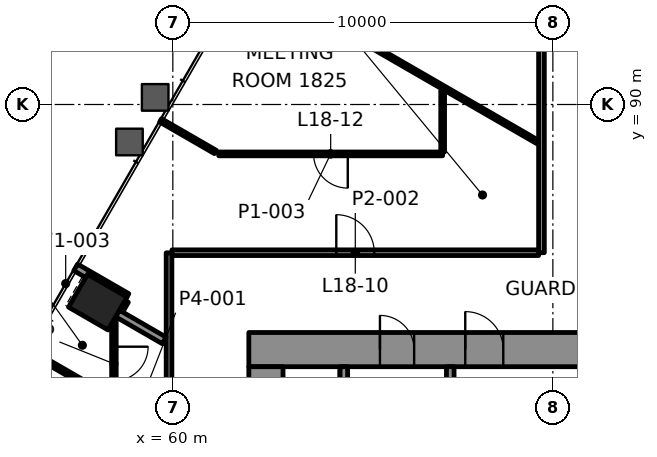
"""IFC4 building model, lengths in metres.
Left out: names, types, materials, properties, quantities, classifications, styles, units other than length and angle.
Written with IfcOpenShell. Run it as: python <this file> out.ifc"""

import sys

from ifc_helpers import new_model, si_unit, direction, frame, frame_2d, origin, origin_2d, place, context, subcontext, project, spatial, rectangle, extrude, element, fill, save


model = new_model("IFC4")
c1 = context("Model", 3, precision=1e-05, world=origin(), true_north=direction((0.0, 1.0)))
c2 = subcontext(c1, "Body", "Model", "MODEL_VIEW")
j1 = project(units=[si_unit("LENGTHUNIT", "METRE"), si_unit("PLANEANGLEUNIT", "RADIAN")], contexts=[c1])
p1 = place(None, origin())
s1 = spatial("IfcSite", under=j1, at=p1, CompositionType="ELEMENT")
p2 = place(p1, origin())
s2 = spatial("IfcBuilding", under=s1, at=p2, CompositionType="ELEMENT")
p3 = place(p2, frame((0.0, 0.0, 82.0)))
s3 = spatial("IfcBuildingStorey", under=s2, at=p3, CompositionType="ELEMENT", Elevation=82.0)
p4 = place(p3, frame((58.025, 84.8, -0.0), z_axis=(0.0, 0.0, 1.0), x_axis=(-0.5, -0.866025403784, 0.0)))
e1 = element("IfcColumn", 1, at=p4, inside=s3, PredefinedType="COLUMN", context=c2, shape_type="SweptSolid", body=[
    extrude(rectangle(XDim=1.0, YDim=1.2, at=origin_2d()), origin(), (0.0, 0.0, 1.0), 4.2),
])
p5 = place(p3, frame((62.0, 83.55, 0.0), z_axis=(0.0, 0.0, 1.0), x_axis=(1.0, 0.0, 0.0)))
e2 = element("IfcWall", 2, at=p5, inside=s3, PredefinedType="SHEAR", context=c2, shape_type="SweptSolid", body=[
    extrude(rectangle(XDim=25.1, YDim=0.9, at=frame_2d((12.55, 0.0))), origin(), (0.0, 0.0, 1.0), 4.0),
])
p6 = place(p5, frame((5.695, 0.0, 0.0)))
e3 = element("IfcOpeningElement", 3, at=p6, cuts=e2, PredefinedType="OPENING", context=c2, shape_type="SweptSolid", body=[
    extrude(rectangle(XDim=1.0, YDim=2.1, at=frame_2d((0.5, 1.05))), frame((0.0, 0.46, 0.0), z_axis=(0.0, -1.0, 0.0), x_axis=(1.0, 0.0, 0.0)), (0.0, 0.0, 1.0), 0.92),
])
p7 = place(p5, frame((19.505, 0.0, 0.0)))
e4 = element("IfcOpeningElement", 4, at=p7, cuts=e2, PredefinedType="OPENING", context=c2, shape_type="SweptSolid", body=[
    extrude(rectangle(XDim=1.0, YDim=2.1, at=frame_2d((0.5, 1.05))), frame((0.0, 0.46, 0.0), z_axis=(0.0, -1.0, 0.0), x_axis=(1.0, 0.0, 0.0)), (0.0, 0.0, 1.0), 0.92),
])
p8 = place(p5, frame((3.45, 0.0, 0.0)))
e5 = element("IfcOpeningElement", 5, at=p8, cuts=e2, PredefinedType="OPENING", context=c2, shape_type="SweptSolid", body=[
    extrude(rectangle(XDim=0.9, YDim=2.1, at=frame_2d((0.45, 1.05))), frame((0.0, 0.46, 0.0), z_axis=(0.0, -1.0, 0.0), x_axis=(1.0, 0.0, 0.0)), (0.0, 0.0, 1.0), 0.92),
])
p9 = place(p5, frame((12.65, 0.0, 0.0)))
e6 = element("IfcOpeningElement", 6, at=p9, cuts=e2, PredefinedType="OPENING", context=c2, shape_type="SweptSolid", body=[
    extrude(rectangle(XDim=0.9, YDim=2.1, at=frame_2d((0.45, 1.05))), frame((0.0, 0.46, 0.0), z_axis=(0.0, -1.0, 0.0), x_axis=(1.0, 0.0, 0.0)), (0.0, 0.0, 1.0), 0.92),
])
p10 = place(p5, frame((22.55, 0.0, 0.0)))
e7 = element("IfcOpeningElement", 7, at=p10, cuts=e2, PredefinedType="OPENING", context=c2, shape_type="SweptSolid", body=[
    extrude(rectangle(XDim=0.9, YDim=2.1, at=frame_2d((0.45, 1.05))), frame((0.0, 0.46, 0.0), z_axis=(0.0, -1.0, 0.0), x_axis=(1.0, 0.0, 0.0)), (0.0, 0.0, 1.0), 0.92),
])
p11 = place(p3, frame((62.45, 66.9, 0.0), z_axis=(0.0, 0.0, 1.0), x_axis=(0.0, 1.0, 0.0)))
e8 = element("IfcWall", 8, at=p11, inside=s3, PredefinedType="SHEAR", context=c2, shape_type="SweptSolid", body=[
    extrude(rectangle(XDim=16.2, YDim=0.9, at=frame_2d((8.1, 0.0))), origin(), (0.0, 0.0, 1.0), 4.0),
])
p12 = place(p11, frame((5.5, 0.0, 0.0)))
e9 = element("IfcOpeningElement", 9, at=p12, cuts=e8, PredefinedType="OPENING", context=c2, shape_type="SweptSolid", body=[
    extrude(rectangle(XDim=1.8, YDim=2.1, at=frame_2d((0.9, 1.05))), frame((0.0, 0.46, 0.0), z_axis=(0.0, -1.0, 0.0), x_axis=(1.0, 0.0, 0.0)), (0.0, 0.0, 1.0), 0.92),
])
p13 = place(p3, frame((59.978, 86.1, 0.0), z_axis=(0.0, 0.0, 1.0), x_axis=(1.0, 0.0, 0.0)))
e10 = element("IfcWall", 10, at=p13, inside=s3, PredefinedType="PARTITIONING", context=c2, shape_type="SweptSolid", body=[
    extrude(rectangle(XDim=9.647, YDim=0.15, at=frame_2d((4.823, 0.0))), origin(), (0.0, 0.0, 1.0), 3.4),
])
p14 = place(p13, frame((4.323, 0.0, 0.0)))
e11 = element("IfcOpeningElement", 11, at=p14, cuts=e10, PredefinedType="OPENING", context=c2, shape_type="SweptSolid", body=[
    extrude(rectangle(XDim=1.0, YDim=2.1, at=frame_2d((0.5, 1.05))), frame((0.0, 0.085, 0.0), z_axis=(0.0, -1.0, 0.0), x_axis=(1.0, 0.0, 0.0)), (0.0, 0.0, 1.0), 0.17),
])
p15 = place(p3, frame((67.1, 88.7, 0.0), z_axis=(0.0, 0.0, 1.0), x_axis=(-1.0, 0.0, 0.0)))
e12 = element("IfcWall", 12, at=p15, inside=s3, PredefinedType="PARTITIONING", context=c2, shape_type="SweptSolid", body=[
    extrude(rectangle(XDim=5.893, YDim=0.1, at=frame_2d((2.947, 0.0))), origin(), (0.0, 0.0, 1.0), 3.4),
])
p16 = place(p15, frame((2.497, 0.0, 0.0)))
e13 = element("IfcOpeningElement", 13, at=p16, cuts=e12, PredefinedType="OPENING", context=c2, shape_type="SweptSolid", body=[
    extrude(rectangle(XDim=0.9, YDim=2.1, at=frame_2d((0.45, 1.05))), frame((0.0, 0.06, 0.0), z_axis=(0.0, -1.0, 0.0), x_axis=(1.0, 0.0, 0.0)), (0.0, 0.0, 1.0), 0.12),
])
p17 = place(p3, frame((58.595, 84.587, 0.0), z_axis=(0.0, 0.0, 1.0), x_axis=(0.499769970942, 0.866158170397, 0.0)))
e14 = element("IfcWall", 14, at=p17, inside=s3, PredefinedType="PARTITIONING", context=c2, shape_type="SweptSolid", body=[
    extrude(rectangle(XDim=0.297, YDim=0.2, at=frame_2d((0.148, 0.0))), origin(), (0.0, 0.0, 1.0), 3.4),
])
p18 = place(p3, frame((69.7, 86.1, 0.0), z_axis=(0.0, 0.0, 1.0), x_axis=(0.0, 1.0, 0.0)))
e15 = element("IfcWall", 15, at=p18, inside=s3, PredefinedType="PARTITIONING", context=c2, shape_type="SweptSolid", body=[
    extrude(rectangle(XDim=10.599, YDim=0.15, at=frame_2d((5.3, 0.0))), origin(), (0.0, 0.0, 1.0), 3.322),
])
p19 = place(p3, frame((67.1, 88.75, 0.0), z_axis=(0.0, 0.0, 1.0), x_axis=(0.0, 1.0, 0.0)))
e16 = element("IfcWall", 16, at=p19, inside=s3, PredefinedType="PARTITIONING", context=c2, shape_type="SweptSolid", body=[
    extrude(rectangle(XDim=1.619, YDim=0.1, at=frame_2d((0.81, 0.0))), origin(), (0.0, 0.0, 1.0), 3.322),
])
p20 = place(p3, frame((59.9, 67.321, 0.0), z_axis=(0.0, 0.0, 1.0), x_axis=(0.0, 1.0, 0.0)))
e17 = element("IfcWall", 17, at=p20, inside=s3, PredefinedType="PARTITIONING", context=c2, shape_type="SweptSolid", body=[
    extrude(rectangle(XDim=18.776, YDim=0.15, at=frame_2d((9.388, 0.0))), origin(), (0.0, 0.0, 1.0), 3.4),
])
p21 = place(p20, frame((11.711, 0.0, 0.0)))
e18 = element("IfcOpeningElement", 18, at=p21, cuts=e17, PredefinedType="OPENING", context=c2, shape_type="SweptSolid", body=[
    extrude(rectangle(XDim=1.2, YDim=2.1, at=frame_2d((0.6, 1.05))), frame((0.0, 0.085, 0.0), z_axis=(0.0, -1.0, 0.0), x_axis=(1.0, 0.0, 0.0)), (0.0, 0.0, 1.0), 0.17),
])
p22 = place(p3, frame((58.45, 84.336, 0.0), z_axis=(0.0, 0.0, 1.0), x_axis=(0.0, -1.0, 0.0)))
e19 = element("IfcWall", 19, at=p22, inside=s3, PredefinedType="PARTITIONING", context=c2, shape_type="SweptSolid", body=[
    extrude(rectangle(XDim=7.953, YDim=0.12, at=frame_2d((3.976, 0.0))), origin(), (0.0, 0.0, 1.0), 3.4),
])
p23 = place(p22, frame((0.709, 0.0, 0.0)))
e20 = element("IfcOpeningElement", 20, at=p23, cuts=e19, PredefinedType="OPENING", context=c2, shape_type="SweptSolid", body=[
    extrude(rectangle(XDim=0.9, YDim=2.1, at=frame_2d((0.45, 1.05))), frame((0.0, 0.07, 0.0), z_axis=(0.0, -1.0, 0.0), x_axis=(1.0, 0.0, 0.0)), (0.0, 0.0, 1.0), 0.14),
])
p24 = place(p22, frame((2.833, 0.0, 0.0)))
e21 = element("IfcOpeningElement", 21, at=p24, cuts=e19, PredefinedType="OPENING", context=c2, shape_type="SweptSolid", body=[
    extrude(rectangle(XDim=0.9, YDim=2.1, at=frame_2d((0.45, 1.05))), frame((0.0, 0.07, 0.0), z_axis=(0.0, -1.0, 0.0), x_axis=(1.0, 0.0, 0.0)), (0.0, 0.0, 1.0), 0.14),
])
p25 = place(p22, frame((5.6, 0.0, 0.0)))
e22 = element("IfcOpeningElement", 22, at=p25, cuts=e19, PredefinedType="OPENING", context=c2, shape_type="SweptSolid", body=[
    extrude(rectangle(XDim=1.0, YDim=2.1, at=frame_2d((0.5, 1.05))), frame((0.0, 0.07, 0.0), z_axis=(0.0, -1.0, 0.0), x_axis=(1.0, 0.0, 0.0)), (0.0, 0.0, 1.0), 0.14),
])
p26 = place(p3, frame((69.599, 89.014, 0.0), z_axis=(0.0, 0.0, 1.0), x_axis=(-0.866016649877, 0.500015161905, 0.0)))
e23 = element("IfcWall", 23, at=p26, inside=s3, PredefinedType="PARTITIONING", context=c2, shape_type="SweptSolid", body=[
    extrude(rectangle(XDim=7.316, YDim=0.1, at=frame_2d((3.658, 0.0))), origin(), (0.0, 0.0, 1.0), 3.322),
])
p27 = place(p3, frame((61.12, 88.75, 0.0), z_axis=(0.0, 0.0, 1.0), x_axis=(-0.865961000814, 0.50011153263, 0.0)))
e24 = element("IfcWall", 24, at=p27, inside=s3, PredefinedType="PARTITIONING", context=c2, shape_type="SweptSolid", body=[
    extrude(rectangle(XDim=1.666, YDim=0.1, at=frame_2d((0.833, 0.0))), origin(), (0.0, 0.0, 1.0), 3.165),
])
p28 = place(p3, frame((58.792, 84.935, 0.0), z_axis=(0.0, 0.0, 1.0), x_axis=(-0.866073306909, 0.499917020175, 0.0)))
e25 = element("IfcWall", 25, at=p28, inside=s3, PredefinedType="PARTITIONING", context=c2, shape_type="SweptSolid", body=[
    extrude(rectangle(XDim=1.557, YDim=0.2, at=frame_2d((0.778, 0.0))), origin(), (0.0, 0.0, 1.0), 3.165),
])
p29 = place(p3, frame((59.773, 83.791, 0.0), z_axis=(0.0, 0.0, 1.0), x_axis=(-0.865999255827, 0.500045286857, 0.0)))
e26 = element("IfcWall", 26, at=p29, inside=s3, PredefinedType="PARTITIONING", context=c2, shape_type="SweptSolid", body=[
    extrude(rectangle(XDim=1.418, YDim=0.2, at=frame_2d((0.709, 0.0))), origin(), (0.0, 0.0, 1.0), 3.4),
])
p30 = place(p3, frame((58.355, 82.275, 0.0), z_axis=(0.0, 0.0, 1.0), x_axis=(-0.866069607179, 0.499923429657, 0.0)))
e27 = element("IfcWall", 27, at=p30, inside=s3, PredefinedType="PARTITIONING", context=c2, shape_type="SweptSolid", body=[
    extrude(rectangle(XDim=2.033, YDim=0.12, at=frame_2d((1.017, 0.0))), origin(), (0.0, 0.0, 1.0), 3.165),
])
p31 = place(p3, frame((64.5, 77.9, 0.0), z_axis=(0.0, 0.0, 1.0), x_axis=(0.0, 1.0, 0.0)))
e28 = element("IfcWall", 28, at=p31, inside=s3, PredefinedType="PARTITIONING", context=c2, shape_type="SweptSolid", body=[
    extrude(rectangle(XDim=5.2, YDim=0.2, at=frame_2d((2.6, 0.0))), origin(), (0.0, 0.0, 1.0), 4.0),
])
p32 = place(p3, frame((67.3, 81.28, 0.0), z_axis=(0.0, 0.0, 1.0), x_axis=(0.0, 1.0, 0.0)))
e29 = element("IfcWall", 29, at=p32, inside=s3, PredefinedType="PARTITIONING", context=c2, shape_type="SweptSolid", body=[
    extrude(rectangle(XDim=1.82, YDim=0.2, at=frame_2d((0.91, 0.0))), origin(), (0.0, 0.0, 1.0), 4.0),
])
p33 = place(p14, origin())
e30 = element("IfcDoor", 30, at=p33, inside=s3, OperationType="SINGLE_SWING_LEFT", PredefinedType="DOOR", context=c2, shape_type="SweptSolid", body=[
    extrude(rectangle(XDim=1.0, YDim=2.1, at=frame_2d((0.5, 1.05))), frame((0.0, 0.025, 0.0), z_axis=(0.0, -1.0, 0.0), x_axis=(1.0, 0.0, 0.0)), (0.0, 0.0, 1.0), 0.05),
])
fill(e11, e30)
p34 = place(p16, origin())
e31 = element("IfcDoor", 31, at=p34, inside=s3, OperationType="SINGLE_SWING_LEFT", PredefinedType="DOOR", context=c2, shape_type="SweptSolid", body=[
    extrude(rectangle(XDim=0.9, YDim=2.1, at=frame_2d((0.45, 1.05))), frame((0.0, 0.025, 0.0), z_axis=(0.0, -1.0, 0.0), x_axis=(1.0, 0.0, 0.0)), (0.0, 0.0, 1.0), 0.05),
])
fill(e13, e31)
p35 = place(p23, origin())
e32 = element("IfcDoor", 32, at=p35, inside=s3, OperationType="SINGLE_SWING_LEFT", PredefinedType="DOOR", context=c2, shape_type="SweptSolid", body=[
    extrude(rectangle(XDim=0.9, YDim=2.1, at=frame_2d((0.45, 1.05))), frame((0.0, 0.025, 0.0), z_axis=(0.0, -1.0, 0.0), x_axis=(1.0, 0.0, 0.0)), (0.0, 0.0, 1.0), 0.05),
])
fill(e20, e32)
p36 = place(p6, origin())
e33 = element("IfcDoor", 33, at=p36, inside=s3, OperationType="SINGLE_SWING_LEFT", PredefinedType="DOOR", context=c2, shape_type="SweptSolid", body=[
    extrude(rectangle(XDim=1.0, YDim=2.1, at=frame_2d((0.5, 1.05))), frame((0.0, 0.17, 0.0), z_axis=(0.0, -1.0, 0.0), x_axis=(1.0, 0.0, 0.0)), (0.0, 0.0, 1.0), 0.34),
])
fill(e3, e33)
p37 = place(p8, origin())
e34 = element("IfcDoor", 34, at=p37, inside=s3, OperationType="SINGLE_SWING_RIGHT", PredefinedType="DOOR", context=c2, shape_type="SweptSolid", body=[
    extrude(rectangle(XDim=0.9, YDim=2.1, at=frame_2d((0.45, 1.05))), frame((0.0, 0.17, 0.0), z_axis=(0.0, -1.0, 0.0), x_axis=(1.0, 0.0, 0.0)), (0.0, 0.0, 1.0), 0.34),
])
fill(e5, e34)
save(model, sys.argv[1])
